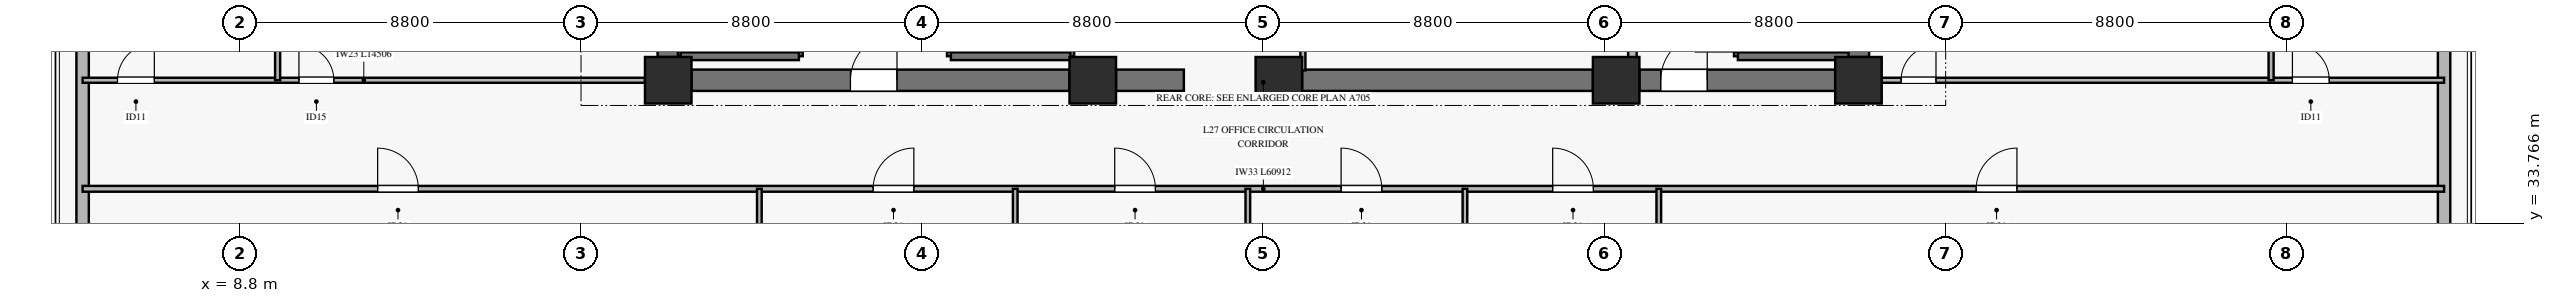
"""IFC4 building model, lengths in metres.
Left out: names, types, materials, properties, quantities, classifications, styles, units other than length and angle.
Written with IfcOpenShell. Run it as: python <this file> out.ifc"""

import sys

from ifc_helpers import new_model, si_unit, direction, frame, frame_2d, origin, origin_2d, place, context, subcontext, project, spatial, rectangle, extrude, source, transform, mapped, element, fill, save


model = new_model("IFC4")
c1 = context("Model", 3, precision=1e-05, world=origin(), true_north=direction((0.0, 1.0)))
c2 = subcontext(c1, "Body", "Model", "MODEL_VIEW")
j1 = project(units=[si_unit("LENGTHUNIT", "METRE"), si_unit("PLANEANGLEUNIT", "RADIAN")], contexts=[c1])
p1 = place(None, origin())
s1 = spatial("IfcSite", under=j1, at=p1, CompositionType="ELEMENT")
p2 = place(p1, origin())
s2 = spatial("IfcBuilding", under=s1, at=p2, CompositionType="ELEMENT")
p3 = place(p2, frame((0.0, 0.0, 111.4)))
s3 = spatial("IfcBuildingStorey", under=s2, at=p3, CompositionType="ELEMENT", Elevation=111.4)
m1 = source(origin(), c2, "Body", "SweptSolid", [
    extrude(rectangle(XDim=1.2, YDim=1.2, at=origin_2d()), origin(), (0.0, 0.0, 1.0), 3.68),
])
for number, where, z_axis, x_axis in (
    (1, (19.85, 37.45, 0.0), (0.0, 0.0, 1.0), (1.0, 0.0, 0.0)),
    (2, (30.8, 37.45, 0.0), (0.0, 0.0, 1.0), (1.0, 0.0, 0.0)),
    (3, (35.6, 37.45, 0.0), (0.0, 0.0, 1.0), (1.0, 0.0, 0.0)),
    (4, (44.3, 37.45, 0.0), (0.0, 0.0, 1.0), (1.0, 0.0, 0.0)),
    (5, (50.55, 37.45, 0.0), (0.0, 0.0, 1.0), (1.0, 0.0, 0.0)),
):
    element("IfcColumn", number, at=place(p3, frame(where, z_axis=z_axis, x_axis=x_axis)), inside=s3, PredefinedType="PILASTER", context=c2, shape_type="MappedRepresentation", body=[
        mapped(m1, transform((0.0, 0.0, 0.0), x_axis=(1.0, 0.0, 0.0), y_axis=(0.0, 1.0, 0.0), z_axis=(0.0, 0.0, 1.0), scale=1.0)),
    ])
p4 = place(p3, frame((20.45, 37.45, 0.0), z_axis=(0.0, 0.0, 1.0), x_axis=(1.0, 0.0, 0.0)))
e6 = element("IfcWall", 6, at=p4, inside=s3, PredefinedType="SHEAR", context=c2, shape_type="SweptSolid", body=[
    extrude(rectangle(XDim=9.75, YDim=0.55, at=frame_2d((4.875, 0.0))), origin(), (0.0, 0.0, 1.0), 3.68),
])
p5 = place(p4, frame((4.1, 0.0, 0.0)))
e7 = element("IfcOpeningElement", 7, at=p5, cuts=e6, PredefinedType="OPENING", context=c2, shape_type="SweptSolid", body=[
    extrude(rectangle(XDim=1.2, YDim=2.15, at=frame_2d((0.6, 1.075))), frame((0.0, 0.285, 0.0), z_axis=(0.0, -1.0, 0.0), x_axis=(1.0, 0.0, 0.0)), (0.0, 0.0, 1.0), 0.57),
])
p6 = place(p3, frame((31.4, 37.45, 0.0), z_axis=(0.0, 0.0, 1.0), x_axis=(1.0, 0.0, 0.0)))
e8 = element("IfcWall", 8, at=p6, inside=s3, PredefinedType="SHEAR", context=c2, shape_type="SweptSolid", body=[
    extrude(rectangle(XDim=1.75, YDim=0.55, at=frame_2d((0.875, 0.0))), origin(), (0.0, 0.0, 1.0), 3.68),
])
p7 = place(p3, frame((36.2, 37.45, 0.0), z_axis=(0.0, 0.0, 1.0), x_axis=(1.0, 0.0, 0.0)))
e9 = element("IfcWall", 9, at=p7, inside=s3, PredefinedType="SHEAR", context=c2, shape_type="SweptSolid", body=[
    extrude(rectangle(XDim=7.5, YDim=0.55, at=frame_2d((3.75, 0.0))), origin(), (0.0, 0.0, 1.0), 3.68),
])
p8 = place(p3, frame((44.9, 37.45, 0.0), z_axis=(0.0, 0.0, 1.0), x_axis=(1.0, 0.0, 0.0)))
e10 = element("IfcWall", 10, at=p8, inside=s3, PredefinedType="SHEAR", context=c2, shape_type="SweptSolid", body=[
    extrude(rectangle(XDim=5.05, YDim=0.55, at=frame_2d((2.525, 0.0))), origin(), (0.0, 0.0, 1.0), 3.68),
])
p9 = place(p8, frame((0.55, 0.0, 0.0)))
e11 = element("IfcOpeningElement", 11, at=p9, cuts=e10, PredefinedType="OPENING", context=c2, shape_type="SweptSolid", body=[
    extrude(rectangle(XDim=1.2, YDim=2.15, at=frame_2d((0.6, 1.075))), frame((0.0, 0.285, 0.0), z_axis=(0.0, -1.0, 0.0), x_axis=(1.0, 0.0, 0.0)), (0.0, 0.0, 1.0), 0.57),
])
for number, where, z_axis, x_axis in (
    (12, (19.85, 38.05, 0.0), (0.0, 0.0, 1.0), (0.0, 1.0, 0.0)),
    (13, (50.55, 38.05, 0.0), (0.0, 0.0, 1.0), (0.0, 1.0, 0.0)),
):
    element("IfcWall", number, at=place(p3, frame(where, z_axis=z_axis, x_axis=x_axis)), inside=s3, PredefinedType="SHEAR", context=c2, shape_type="SweptSolid", body=[
        extrude(rectangle(XDim=7.9, YDim=0.55, at=frame_2d((3.95, 0.0))), origin(), (0.0, 0.0, 1.0), 3.68),
    ])
p10 = place(p3, frame((4.744, 26.995, 0.0), z_axis=(0.0, 0.0, 1.0), x_axis=(0.0, 1.0, 0.0)))
e14 = element("IfcWall", 14, at=p10, inside=s3, PredefinedType="SOLIDWALL", context=c2, shape_type="SweptSolid", body=[
    extrude(rectangle(XDim=16.088, YDim=0.32, at=frame_2d((8.044, 0.0))), origin(), (0.0, 0.0, 1.0), 3.16),
])
p11 = place(p10, frame((3.931, 0.0, 0.45)))
e15 = element("IfcOpeningElement", 15, at=p11, cuts=e14, PredefinedType="OPENING", context=c2, shape_type="SweptSolid", body=[
    extrude(rectangle(XDim=2.4, YDim=2.1, at=frame_2d((1.2, 1.05))), frame((0.0, 0.17, 0.0), z_axis=(0.0, -1.0, 0.0), x_axis=(1.0, 0.0, 0.0)), (0.0, 0.0, 1.0), 0.34),
])
p12 = place(p3, frame((65.656, 26.995, 0.0), z_axis=(0.0, 0.0, 1.0), x_axis=(0.0, 1.0, 0.0)))
e16 = element("IfcWall", 16, at=p12, inside=s3, PredefinedType="SOLIDWALL", context=c2, shape_type="SweptSolid", body=[
    extrude(rectangle(XDim=16.088, YDim=0.32, at=frame_2d((8.044, 0.0))), origin(), (0.0, 0.0, 1.0), 3.16),
])
p13 = place(p12, frame((3.931, 0.0, 0.45)))
e17 = element("IfcOpeningElement", 17, at=p13, cuts=e16, PredefinedType="OPENING", context=c2, shape_type="SweptSolid", body=[
    extrude(rectangle(XDim=2.4, YDim=2.1, at=frame_2d((1.2, 1.05))), frame((0.0, 0.17, 0.0), z_axis=(0.0, -1.0, 0.0), x_axis=(1.0, 0.0, 0.0)), (0.0, 0.0, 1.0), 0.34),
])
p14 = place(p3, frame((20.17, 38.07, 0.0), z_axis=(0.0, 0.0, 1.0), x_axis=(0.0, 1.0, 0.0)))
e18 = element("IfcWall", 18, at=p14, inside=s3, PredefinedType="SOLIDWALL", context=c2, shape_type="SweptSolid", body=[
    extrude(rectangle(XDim=7.25, YDim=0.14, at=frame_2d((3.625, 0.0))), origin(), (0.0, 0.0, 1.0), 3.9),
])
p15 = place(p3, frame((23.22, 38.07, 0.0), z_axis=(0.0, 0.0, 1.0), x_axis=(0.0, 1.0, 0.0)))
e19 = element("IfcWall", 19, at=p15, inside=s3, PredefinedType="SOLIDWALL", context=c2, shape_type="SweptSolid", body=[
    extrude(rectangle(XDim=7.25, YDim=0.2, at=frame_2d((3.625, 0.0))), origin(), (0.0, 0.0, 1.0), 3.9),
])
p16 = place(p15, frame((0.11, 0.0, 0.0)))
e20 = element("IfcOpeningElement", 20, at=p16, cuts=e19, PredefinedType="OPENING", context=c2, shape_type="SweptSolid", body=[
    extrude(rectangle(XDim=1.1, YDim=2.15, at=frame_2d((0.55, 1.075))), frame((0.0, 0.11, 0.0), z_axis=(0.0, -1.0, 0.0), x_axis=(1.0, 0.0, 0.0)), (0.0, 0.0, 1.0), 0.22),
])
p17 = place(p3, frame((20.17, 38.07, 0.0), z_axis=(0.0, 0.0, 1.0), x_axis=(1.0, 0.0, 0.0)))
e21 = element("IfcWall", 21, at=p17, inside=s3, PredefinedType="SOLIDWALL", context=c2, shape_type="SweptSolid", body=[
    extrude(rectangle(XDim=3.05, YDim=0.2, at=frame_2d((1.525, 0.0))), origin(), (0.0, 0.0, 1.0), 3.9),
])
p18 = place(p3, frame((27.14, 38.07, 0.0), z_axis=(0.0, 0.0, 1.0), x_axis=(0.0, 1.0, 0.0)))
e22 = element("IfcWall", 22, at=p18, inside=s3, PredefinedType="SOLIDWALL", context=c2, shape_type="SweptSolid", body=[
    extrude(rectangle(XDim=7.25, YDim=0.2, at=frame_2d((3.625, 0.0))), origin(), (0.0, 0.0, 1.0), 3.9),
])
p19 = place(p18, frame((0.11, 0.0, 0.0)))
e23 = element("IfcOpeningElement", 23, at=p19, cuts=e22, PredefinedType="OPENING", context=c2, shape_type="SweptSolid", body=[
    extrude(rectangle(XDim=1.1, YDim=2.15, at=frame_2d((0.55, 1.075))), frame((0.0, 0.11, 0.0), z_axis=(0.0, -1.0, 0.0), x_axis=(1.0, 0.0, 0.0)), (0.0, 0.0, 1.0), 0.22),
])
p20 = place(p3, frame((30.22, 38.07, 0.0), z_axis=(0.0, 0.0, 1.0), x_axis=(0.0, 1.0, 0.0)))
e24 = element("IfcWall", 24, at=p20, inside=s3, PredefinedType="SOLIDWALL", context=c2, shape_type="SweptSolid", body=[
    extrude(rectangle(XDim=7.25, YDim=0.2, at=frame_2d((3.625, 0.0))), origin(), (0.0, 0.0, 1.0), 3.9),
])
p21 = place(p3, frame((27.14, 38.07, 0.0), z_axis=(0.0, 0.0, 1.0), x_axis=(1.0, 0.0, 0.0)))
e25 = element("IfcWall", 25, at=p21, inside=s3, PredefinedType="SOLIDWALL", context=c2, shape_type="SweptSolid", body=[
    extrude(rectangle(XDim=3.08, YDim=0.2, at=frame_2d((1.54, 0.0))), origin(), (0.0, 0.0, 1.0), 3.9),
])
p22 = place(p3, frame((47.44, 38.07, 0.0), z_axis=(0.0, 0.0, 1.0), x_axis=(0.0, 1.0, 0.0)))
e26 = element("IfcWall", 26, at=p22, inside=s3, PredefinedType="SOLIDWALL", context=c2, shape_type="SweptSolid", body=[
    extrude(rectangle(XDim=7.25, YDim=0.2, at=frame_2d((3.625, 0.0))), origin(), (0.0, 0.0, 1.0), 3.9),
])
p23 = place(p22, frame((0.11, 0.0, 0.0)))
e27 = element("IfcOpeningElement", 27, at=p23, cuts=e26, PredefinedType="OPENING", context=c2, shape_type="SweptSolid", body=[
    extrude(rectangle(XDim=1.1, YDim=2.15, at=frame_2d((0.55, 1.075))), frame((0.0, 0.11, 0.0), z_axis=(0.0, -1.0, 0.0), x_axis=(1.0, 0.0, 0.0)), (0.0, 0.0, 1.0), 0.22),
])
p24 = place(p3, frame((47.44, 38.07, 0.0), z_axis=(0.0, 0.0, 1.0), x_axis=(1.0, 0.0, 0.0)))
e28 = element("IfcWall", 28, at=p24, inside=s3, PredefinedType="SOLIDWALL", context=c2, shape_type="SweptSolid", body=[
    extrude(rectangle(XDim=2.855, YDim=0.2, at=frame_2d((1.427, 0.0))), origin(), (0.0, 0.0, 1.0), 3.9),
])
p25 = place(p3, frame((44.72, 37.705, 0.0), z_axis=(0.0, 0.0, 1.0), x_axis=(0.0, 1.0, 0.0)))
e29 = element("IfcWall", 29, at=p25, inside=s3, PredefinedType="SOLIDWALL", context=c2, shape_type="SweptSolid", body=[
    extrude(rectangle(XDim=7.515, YDim=0.22, at=frame_2d((3.757, 0.0))), origin(), (0.0, 0.0, 1.0), 3.68),
])
p26 = place(p3, frame((36.22, 37.705, 0.0), z_axis=(0.0, 0.0, 1.0), x_axis=(0.0, 1.0, 0.0)))
e30 = element("IfcWall", 30, at=p26, inside=s3, PredefinedType="PARTITIONING", context=c2, shape_type="SweptSolid", body=[
    extrude(rectangle(XDim=2.215, YDim=0.13, at=frame_2d((1.107, 0.0))), origin(), (0.0, 0.0, 1.0), 3.68),
])
p27 = place(p26, frame((0.905, 0.0, 0.0)))
e31 = element("IfcOpeningElement", 31, at=p27, cuts=e30, PredefinedType="OPENING", context=c2, shape_type="SweptSolid", body=[
    extrude(rectangle(XDim=0.9, YDim=2.1, at=frame_2d((0.45, 1.05))), frame((0.0, 0.075, 0.0), z_axis=(0.0, -1.0, 0.0), x_axis=(1.0, 0.0, 0.0)), (0.0, 0.0, 1.0), 0.15),
])
p28 = place(p3, frame((4.744, 34.65, 0.0), z_axis=(0.0, 0.0, 1.0), x_axis=(1.0, 0.0, 0.0)))
e32 = element("IfcWall", 32, at=p28, inside=s3, PredefinedType="PARTITIONING", context=c2, shape_type="SweptSolid", body=[
    extrude(rectangle(XDim=60.912, YDim=0.15, at=frame_2d((30.456, 0.0))), origin(), (0.0, 0.0, 1.0), 2.765),
])
p29 = place(p28, frame((7.61, 0.0, 0.0)))
e33 = element("IfcOpeningElement", 33, at=p29, cuts=e32, PredefinedType="OPENING", context=c2, shape_type="SweptSolid", body=[
    extrude(rectangle(XDim=1.05, YDim=2.15, at=frame_2d((0.525, 1.075))), frame((0.0, 0.085, 0.0), z_axis=(0.0, -1.0, 0.0), x_axis=(1.0, 0.0, 0.0)), (0.0, 0.0, 1.0), 0.17),
])
p30 = place(p28, frame((20.391, 0.0, 0.0)))
e34 = element("IfcOpeningElement", 34, at=p30, cuts=e32, PredefinedType="OPENING", context=c2, shape_type="SweptSolid", body=[
    extrude(rectangle(XDim=1.05, YDim=2.15, at=frame_2d((0.525, 1.075))), frame((0.0, 0.085, 0.0), z_axis=(0.0, -1.0, 0.0), x_axis=(1.0, 0.0, 0.0)), (0.0, 0.0, 1.0), 0.17),
])
p31 = place(p28, frame((26.622, 0.0, 0.0)))
e35 = element("IfcOpeningElement", 35, at=p31, cuts=e32, PredefinedType="OPENING", context=c2, shape_type="SweptSolid", body=[
    extrude(rectangle(XDim=1.05, YDim=2.15, at=frame_2d((0.525, 1.075))), frame((0.0, 0.085, 0.0), z_axis=(0.0, -1.0, 0.0), x_axis=(1.0, 0.0, 0.0)), (0.0, 0.0, 1.0), 0.17),
])
p32 = place(p28, frame((32.462, 0.0, 0.0)))
e36 = element("IfcOpeningElement", 36, at=p32, cuts=e32, PredefinedType="OPENING", context=c2, shape_type="SweptSolid", body=[
    extrude(rectangle(XDim=1.05, YDim=2.15, at=frame_2d((0.525, 1.075))), frame((0.0, 0.085, 0.0), z_axis=(0.0, -1.0, 0.0), x_axis=(1.0, 0.0, 0.0)), (0.0, 0.0, 1.0), 0.17),
])
p33 = place(p28, frame((37.919, 0.0, 0.0)))
e37 = element("IfcOpeningElement", 37, at=p33, cuts=e32, PredefinedType="OPENING", context=c2, shape_type="SweptSolid", body=[
    extrude(rectangle(XDim=1.05, YDim=2.15, at=frame_2d((0.525, 1.075))), frame((0.0, 0.085, 0.0), z_axis=(0.0, -1.0, 0.0), x_axis=(1.0, 0.0, 0.0)), (0.0, 0.0, 1.0), 0.17),
])
p34 = place(p28, frame((48.844, 0.0, 0.0)))
e38 = element("IfcOpeningElement", 38, at=p34, cuts=e32, PredefinedType="OPENING", context=c2, shape_type="SweptSolid", body=[
    extrude(rectangle(XDim=1.05, YDim=2.15, at=frame_2d((0.525, 1.075))), frame((0.0, 0.085, 0.0), z_axis=(0.0, -1.0, 0.0), x_axis=(1.0, 0.0, 0.0)), (0.0, 0.0, 1.0), 0.17),
])
for number, where, z_axis, x_axis in (
    (39, (22.2, 6.99, 0.0), (0.0, 0.0, 1.0), (0.0, 1.0, 0.0)),
    (40, (28.8, 6.99, 0.0), (0.0, 0.0, 1.0), (0.0, 1.0, 0.0)),
    (41, (34.8, 6.99, 0.0), (0.0, 0.0, 1.0), (0.0, 1.0, 0.0)),
    (42, (40.4, 6.99, 0.0), (0.0, 0.0, 1.0), (0.0, 1.0, 0.0)),
    (43, (45.4, 6.99, 0.0), (0.0, 0.0, 1.0), (0.0, 1.0, 0.0)),
):
    element("IfcWall", number, at=place(p3, frame(where, z_axis=z_axis, x_axis=x_axis)), inside=s3, PredefinedType="PARTITIONING", context=c2, shape_type="SweptSolid", body=[
        extrude(rectangle(XDim=27.66, YDim=0.12, at=frame_2d((13.83, 0.0))), origin(), (0.0, 0.0, 1.0), 3.165),
    ])
p35 = place(p3, frame((4.744, 37.45, 0.0), z_axis=(0.0, 0.0, 1.0), x_axis=(1.0, 0.0, 0.0)))
e44 = element("IfcWall", 44, at=p35, inside=s3, PredefinedType="PARTITIONING", context=c2, shape_type="SweptSolid", body=[
    extrude(rectangle(XDim=14.506, YDim=0.13, at=frame_2d((7.253, 0.0))), origin(), (0.0, 0.0, 1.0), 3.165),
])
p36 = place(p35, frame((0.9, 0.0, 0.0)))
e45 = element("IfcOpeningElement", 45, at=p36, cuts=e44, PredefinedType="OPENING", context=c2, shape_type="SweptSolid", body=[
    extrude(rectangle(XDim=0.95, YDim=2.1, at=frame_2d((0.475, 1.05))), frame((0.0, 0.075, 0.0), z_axis=(0.0, -1.0, 0.0), x_axis=(1.0, 0.0, 0.0)), (0.0, 0.0, 1.0), 0.15),
])
p37 = place(p35, frame((5.58, 0.0, 0.0)))
e46 = element("IfcOpeningElement", 46, at=p37, cuts=e44, PredefinedType="OPENING", context=c2, shape_type="SweptSolid", body=[
    extrude(rectangle(XDim=0.9, YDim=2.1, at=frame_2d((0.45, 1.05))), frame((0.0, 0.075, 0.0), z_axis=(0.0, -1.0, 0.0), x_axis=(1.0, 0.0, 0.0)), (0.0, 0.0, 1.0), 0.15),
])
p38 = place(p3, frame((9.774, 37.45, 0.0), z_axis=(0.0, 0.0, 1.0), x_axis=(0.0, 1.0, 0.0)))
e47 = element("IfcWall", 47, at=p38, inside=s3, PredefinedType="PARTITIONING", context=c2, shape_type="SweptSolid", body=[
    extrude(rectangle(XDim=8.8, YDim=0.13, at=frame_2d((4.4, 0.0))), origin(), (0.0, 0.0, 1.0), 3.68),
])
p39 = place(p3, frame((51.15, 37.45, 0.0), z_axis=(0.0, 0.0, 1.0), x_axis=(1.0, 0.0, 0.0)))
e48 = element("IfcWall", 48, at=p39, inside=s3, PredefinedType="PARTITIONING", context=c2, shape_type="SweptSolid", body=[
    extrude(rectangle(XDim=14.506, YDim=0.13, at=frame_2d((7.253, 0.0))), origin(), (0.0, 0.0, 1.0), 3.165),
])
p40 = place(p39, frame((0.5, 0.0, 0.0)))
e49 = element("IfcOpeningElement", 49, at=p40, cuts=e48, PredefinedType="OPENING", context=c2, shape_type="SweptSolid", body=[
    extrude(rectangle(XDim=0.9, YDim=2.1, at=frame_2d((0.45, 1.05))), frame((0.0, 0.075, 0.0), z_axis=(0.0, -1.0, 0.0), x_axis=(1.0, 0.0, 0.0)), (0.0, 0.0, 1.0), 0.15),
])
p41 = place(p39, frame((10.594, 0.0, 0.0)))
e50 = element("IfcOpeningElement", 50, at=p41, cuts=e48, PredefinedType="OPENING", context=c2, shape_type="SweptSolid", body=[
    extrude(rectangle(XDim=0.95, YDim=2.1, at=frame_2d((0.475, 1.05))), frame((0.0, 0.075, 0.0), z_axis=(0.0, -1.0, 0.0), x_axis=(1.0, 0.0, 0.0)), (0.0, 0.0, 1.0), 0.15),
])
p42 = place(p3, frame((61.194, 37.45, 0.0), z_axis=(0.0, 0.0, 1.0), x_axis=(0.0, 1.0, 0.0)))
e51 = element("IfcWall", 51, at=p42, inside=s3, PredefinedType="PARTITIONING", context=c2, shape_type="SweptSolid", body=[
    extrude(rectangle(XDim=8.8, YDim=0.13, at=frame_2d((4.4, 0.0))), origin(), (0.0, 0.0, 1.0), 3.68),
])
m2 = source(origin(), c2, "Body", "SweptSolid", [
    extrude(rectangle(XDim=1.2, YDim=2.15, at=frame_2d((0.6, 1.075))), frame((0.0, 0.025, 0.0), z_axis=(0.0, -1.0, 0.0), x_axis=(1.0, 0.0, 0.0)), (0.0, 0.0, 1.0), 0.05),
])
p43 = place(p5, origin())
e52 = element("IfcDoor", 52, at=p43, inside=s3, OperationType="SINGLE_SWING_RIGHT", PredefinedType="DOOR", context=c2, shape_type="MappedRepresentation", body=[
    mapped(m2, transform((0.0, 0.0, 0.0), x_axis=(1.0, 0.0, 0.0), y_axis=(0.0, 1.0, 0.0), z_axis=(0.0, 0.0, 1.0), scale=1.0)),
])
fill(e7, e52)
p44 = place(p9, origin())
e53 = element("IfcDoor", 53, at=p44, inside=s3, OperationType="SINGLE_SWING_RIGHT", PredefinedType="DOOR", context=c2, shape_type="MappedRepresentation", body=[
    mapped(m2, transform((0.0, 0.0, 0.0), x_axis=(1.0, 0.0, 0.0), y_axis=(0.0, 1.0, 0.0), z_axis=(0.0, 0.0, 1.0), scale=1.0)),
])
fill(e11, e53)
m3 = source(origin(), c2, "Body", "SweptSolid", [
    extrude(rectangle(XDim=1.05, YDim=2.15, at=frame_2d((0.525, 1.075))), frame((0.0, 0.025, 0.0), z_axis=(0.0, -1.0, 0.0), x_axis=(1.0, 0.0, 0.0)), (0.0, 0.0, 1.0), 0.05),
])
p45 = place(p29, origin())
e54 = element("IfcDoor", 54, at=p45, inside=s3, OperationType="SINGLE_SWING_LEFT", PredefinedType="DOOR", context=c2, shape_type="MappedRepresentation", body=[
    mapped(m3, transform((0.0, 0.0, 0.0), x_axis=(1.0, 0.0, 0.0), y_axis=(0.0, 1.0, 0.0), z_axis=(0.0, 0.0, 1.0), scale=1.0)),
])
fill(e33, e54)
p46 = place(p30, origin())
e55 = element("IfcDoor", 55, at=p46, inside=s3, OperationType="SINGLE_SWING_RIGHT", PredefinedType="DOOR", context=c2, shape_type="MappedRepresentation", body=[
    mapped(m3, transform((0.0, 0.0, 0.0), x_axis=(1.0, 0.0, 0.0), y_axis=(0.0, 1.0, 0.0), z_axis=(0.0, 0.0, 1.0), scale=1.0)),
])
fill(e34, e55)
p47 = place(p31, origin())
e56 = element("IfcDoor", 56, at=p47, inside=s3, OperationType="SINGLE_SWING_LEFT", PredefinedType="DOOR", context=c2, shape_type="MappedRepresentation", body=[
    mapped(m3, transform((0.0, 0.0, 0.0), x_axis=(1.0, 0.0, 0.0), y_axis=(0.0, 1.0, 0.0), z_axis=(0.0, 0.0, 1.0), scale=1.0)),
])
fill(e35, e56)
p48 = place(p32, origin())
e57 = element("IfcDoor", 57, at=p48, inside=s3, OperationType="SINGLE_SWING_LEFT", PredefinedType="DOOR", context=c2, shape_type="MappedRepresentation", body=[
    mapped(m3, transform((0.0, 0.0, 0.0), x_axis=(1.0, 0.0, 0.0), y_axis=(0.0, 1.0, 0.0), z_axis=(0.0, 0.0, 1.0), scale=1.0)),
])
fill(e36, e57)
p49 = place(p33, origin())
e58 = element("IfcDoor", 58, at=p49, inside=s3, OperationType="SINGLE_SWING_LEFT", PredefinedType="DOOR", context=c2, shape_type="MappedRepresentation", body=[
    mapped(m3, transform((0.0, 0.0, 0.0), x_axis=(1.0, 0.0, 0.0), y_axis=(0.0, 1.0, 0.0), z_axis=(0.0, 0.0, 1.0), scale=1.0)),
])
fill(e37, e58)
p50 = place(p34, origin())
e59 = element("IfcDoor", 59, at=p50, inside=s3, OperationType="SINGLE_SWING_RIGHT", PredefinedType="DOOR", context=c2, shape_type="MappedRepresentation", body=[
    mapped(m3, transform((0.0, 0.0, 0.0), x_axis=(1.0, 0.0, 0.0), y_axis=(0.0, 1.0, 0.0), z_axis=(0.0, 0.0, 1.0), scale=1.0)),
])
fill(e38, e59)
m4 = source(origin(), c2, "Body", "SweptSolid", [
    extrude(rectangle(XDim=0.95, YDim=2.1, at=frame_2d((0.475, 1.05))), frame((0.0, 0.025, 0.0), z_axis=(0.0, -1.0, 0.0), x_axis=(1.0, 0.0, 0.0)), (0.0, 0.0, 1.0), 0.05),
])
p51 = place(p36, origin())
e60 = element("IfcDoor", 60, at=p51, inside=s3, OperationType="SINGLE_SWING_RIGHT", PredefinedType="DOOR", context=c2, shape_type="MappedRepresentation", body=[
    mapped(m4, transform((0.0, 0.0, 0.0), x_axis=(1.0, 0.0, 0.0), y_axis=(0.0, 1.0, 0.0), z_axis=(0.0, 0.0, 1.0), scale=1.0)),
])
fill(e45, e60)
m5 = source(origin(), c2, "Body", "SweptSolid", [
    extrude(rectangle(XDim=0.9, YDim=2.1, at=frame_2d((0.45, 1.05))), frame((0.0, 0.025, 0.0), z_axis=(0.0, -1.0, 0.0), x_axis=(1.0, 0.0, 0.0)), (0.0, 0.0, 1.0), 0.05),
])
p52 = place(p37, origin())
e61 = element("IfcDoor", 61, at=p52, inside=s3, OperationType="SINGLE_SWING_LEFT", PredefinedType="DOOR", context=c2, shape_type="MappedRepresentation", body=[
    mapped(m5, transform((0.0, 0.0, 0.0), x_axis=(1.0, 0.0, 0.0), y_axis=(0.0, 1.0, 0.0), z_axis=(0.0, 0.0, 1.0), scale=1.0)),
])
fill(e46, e61)
p53 = place(p40, origin())
e62 = element("IfcDoor", 62, at=p53, inside=s3, OperationType="SINGLE_SWING_RIGHT", PredefinedType="DOOR", context=c2, shape_type="MappedRepresentation", body=[
    mapped(m5, transform((0.0, 0.0, 0.0), x_axis=(1.0, 0.0, 0.0), y_axis=(0.0, 1.0, 0.0), z_axis=(0.0, 0.0, 1.0), scale=1.0)),
])
fill(e49, e62)
p54 = place(p41, origin())
e63 = element("IfcDoor", 63, at=p54, inside=s3, OperationType="SINGLE_SWING_LEFT", PredefinedType="DOOR", context=c2, shape_type="MappedRepresentation", body=[
    mapped(m4, transform((0.0, 0.0, 0.0), x_axis=(1.0, 0.0, 0.0), y_axis=(0.0, 1.0, 0.0), z_axis=(0.0, 0.0, 1.0), scale=1.0)),
])
fill(e50, e63)
save(model, sys.argv[1])
